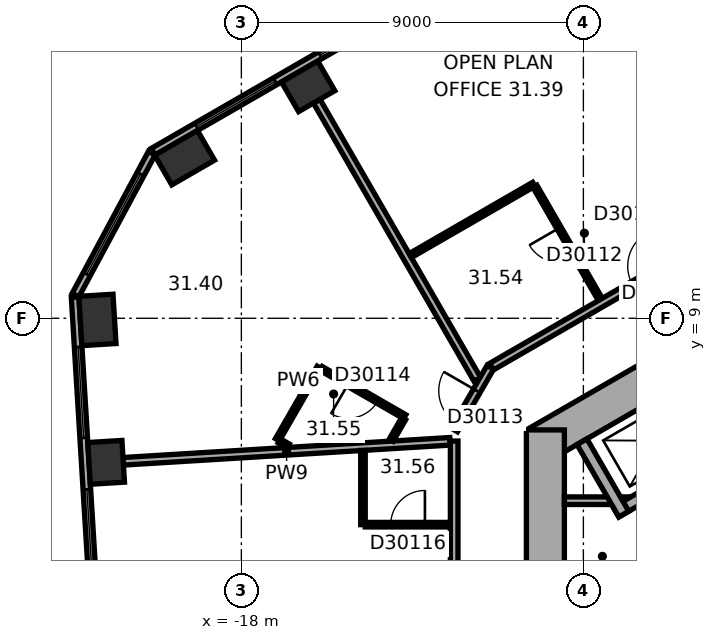
"""IFC4 building model, lengths in metres.
Left out: names, types, materials, properties, quantities, classifications, styles, units other than length and angle.
Written with IfcOpenShell. Run it as: python <this file> out.ifc"""

import sys

from ifc_helpers import new_model, si_unit, direction, frame, frame_2d, origin, origin_2d, place, context, subcontext, project, spatial, rectangle, extrude, element, fill, save


model = new_model("IFC4")
c1 = context("Model", 3, precision=1e-05, world=origin(), true_north=direction((0.0, 1.0)))
c2 = subcontext(c1, "Body", "Model", "MODEL_VIEW")
j1 = project(units=[si_unit("LENGTHUNIT", "METRE"), si_unit("PLANEANGLEUNIT", "RADIAN")], contexts=[c1])
p1 = place(None, origin())
s1 = spatial("IfcSite", under=j1, at=p1, CompositionType="ELEMENT")
p2 = place(p1, origin())
s2 = spatial("IfcBuilding", under=s1, at=p2, CompositionType="ELEMENT")
p3 = place(p2, frame((0.0, 0.0, 128.1)))
s3 = spatial("IfcBuildingStorey", under=s2, at=p3, CompositionType="ELEMENT", Elevation=128.1)
p4 = place(p3, frame((-16.242, 15.102, 0.0), z_axis=(0.0, 0.0, 1.0), x_axis=(-0.866025403784, -0.5, 0.0)))
e1 = element("IfcColumn", 1, at=p4, inside=s3, PredefinedType="COLUMN", context=c2, shape_type="SweptSolid", body=[
    extrude(rectangle(XDim=1.1, YDim=0.9, at=origin_2d()), origin(), (0.0, 0.0, 1.0), 3.7),
])
for number, where, z_axis, x_axis in (
    (2, (-19.494, 13.225, 0.0), (0.0, 0.0, 1.0), (-0.866, -0.5, 0.0)),
    (3, (-21.787, 8.956, 0.0), (0.0, 0.0, 1.0), (0.061, -0.998, 0.0)),
):
    element("IfcColumn", number, at=place(p3, frame(where, z_axis=z_axis, x_axis=x_axis)), inside=s3, PredefinedType="COLUMN", context=c2, shape_type="SweptSolid", body=[
        extrude(rectangle(XDim=1.3, YDim=0.9, at=origin_2d()), origin(), (0.0, 0.0, 1.0), 3.7),
    ])
p5 = place(p3, frame((-21.558, 5.209, 0.0), z_axis=(0.0, 0.0, 1.0), x_axis=(0.061048539535, -0.998134798422, 0.0)))
e4 = element("IfcColumn", 4, at=p5, inside=s3, PredefinedType="COLUMN", context=c2, shape_type="SweptSolid", body=[
    extrude(rectangle(XDim=1.1, YDim=0.9, at=origin_2d()), origin(), (0.0, 0.0, 1.0), 3.7),
])
p6 = place(p3, frame((0.25, 11.691, 0.0), z_axis=(0.0, 0.0, 1.0), x_axis=(-0.866022616891, -0.50000482701, 0.0)))
e5 = element("IfcWall", 5, at=p6, inside=s3, PredefinedType="SHEAR", context=c2, shape_type="SweptSolid", body=[
    extrude(rectangle(XDim=12.125, YDim=1.0, at=frame_2d((6.062, 0.0))), origin(), (0.0, 0.0, 1.0), 3.7),
])
p7 = place(p6, frame((6.262, 0.0, 0.0)))
e6 = element("IfcOpeningElement", 6, at=p7, cuts=e5, PredefinedType="OPENING", context=c2, shape_type="SweptSolid", body=[
    extrude(rectangle(XDim=1.5, YDim=2.1, at=frame_2d((0.75, 1.05))), frame((0.0, 0.51, 0.0), z_axis=(0.0, -1.0, 0.0), x_axis=(1.0, 0.0, 0.0)), (0.0, 0.0, 1.0), 1.02),
])
p8 = place(p6, frame((1.712, 0.0, 0.0)))
e7 = element("IfcOpeningElement", 7, at=p8, cuts=e5, PredefinedType="OPENING", context=c2, shape_type="SweptSolid", body=[
    extrude(rectangle(XDim=1.1, YDim=2.1, at=frame_2d((0.55, 1.05))), frame((0.0, 0.51, 0.0), z_axis=(0.0, -1.0, 0.0), x_axis=(1.0, 0.0, 0.0)), (0.0, 0.0, 1.0), 1.02),
])
p9 = place(p3, frame((-10.0, 6.062, 0.0), z_axis=(0.0, 0.0, 1.0), x_axis=(0.0, -1.0, 0.0)))
e8 = element("IfcWall", 8, at=p9, inside=s3, PredefinedType="SHEAR", context=c2, shape_type="SweptSolid", body=[
    extrude(rectangle(XDim=12.125, YDim=1.0, at=frame_2d((6.062, 0.0))), origin(), (0.0, 0.0, 1.0), 3.7),
])
p10 = place(p9, frame((6.612, 0.0, 0.0)))
e9 = element("IfcOpeningElement", 9, at=p10, cuts=e8, PredefinedType="OPENING", context=c2, shape_type="SweptSolid", body=[
    extrude(rectangle(XDim=0.9, YDim=2.1, at=frame_2d((0.45, 1.05))), frame((0.0, 0.51, 0.0), z_axis=(0.0, -1.0, 0.0), x_axis=(1.0, 0.0, 0.0)), (0.0, 0.0, 1.0), 1.02),
])
p11 = place(p3, frame((-2.961, 23.405, 0.0), z_axis=(0.0, 0.0, 1.0), x_axis=(-0.866023315909, -0.500003616288, 0.0)))
e10 = element("IfcWall", 10, at=p11, inside=s3, PredefinedType="STANDARD", context=c2, shape_type="SweptSolid", body=[
    extrude(rectangle(XDim=20.044, YDim=0.2, at=frame_2d((10.022, 0.0))), origin(), (0.0, 0.0, 1.0), 3.7),
])
p12 = place(p11, frame((1.314, 0.0, 0.9)))
e11 = element("IfcOpeningElement", 11, at=p12, cuts=e10, PredefinedType="OPENING", context=c2, shape_type="SweptSolid", body=[
    extrude(rectangle(XDim=2.4, YDim=2.0, at=frame_2d((1.2, 1.0))), frame((0.0, 0.11, 0.0), z_axis=(0.0, -1.0, 0.0), x_axis=(1.0, 0.0, 0.0)), (0.0, 0.0, 1.0), 0.22),
])
p13 = place(p11, frame((5.069, 0.0, 0.9)))
e12 = element("IfcOpeningElement", 12, at=p13, cuts=e10, PredefinedType="OPENING", context=c2, shape_type="SweptSolid", body=[
    extrude(rectangle(XDim=2.4, YDim=2.0, at=frame_2d((1.2, 1.0))), frame((0.0, 0.11, 0.0), z_axis=(0.0, -1.0, 0.0), x_axis=(1.0, 0.0, 0.0)), (0.0, 0.0, 1.0), 0.22),
])
p14 = place(p11, frame((8.823, 0.0, 0.9)))
e13 = element("IfcOpeningElement", 13, at=p14, cuts=e10, PredefinedType="OPENING", context=c2, shape_type="SweptSolid", body=[
    extrude(rectangle(XDim=2.4, YDim=2.0, at=frame_2d((1.2, 1.0))), frame((0.0, 0.11, 0.0), z_axis=(0.0, -1.0, 0.0), x_axis=(1.0, 0.0, 0.0)), (0.0, 0.0, 1.0), 0.22),
])
p15 = place(p11, frame((12.577, 0.0, 0.9)))
e14 = element("IfcOpeningElement", 14, at=p15, cuts=e10, PredefinedType="OPENING", context=c2, shape_type="SweptSolid", body=[
    extrude(rectangle(XDim=2.4, YDim=2.0, at=frame_2d((1.2, 1.0))), frame((0.0, 0.11, 0.0), z_axis=(0.0, -1.0, 0.0), x_axis=(1.0, 0.0, 0.0)), (0.0, 0.0, 1.0), 0.22),
])
p16 = place(p11, frame((16.331, 0.0, 0.9)))
e15 = element("IfcOpeningElement", 15, at=p16, cuts=e10, PredefinedType="OPENING", context=c2, shape_type="SweptSolid", body=[
    extrude(rectangle(XDim=2.4, YDim=2.0, at=frame_2d((1.2, 1.0))), frame((0.0, 0.11, 0.0), z_axis=(0.0, -1.0, 0.0), x_axis=(1.0, 0.0, 0.0)), (0.0, 0.0, 1.0), 0.22),
])
p17 = place(p3, frame((-20.357, 13.344, 0.0), z_axis=(0.0, 0.0, 1.0), x_axis=(-0.473288913494, -0.880907262068, 0.0)))
e16 = element("IfcWall", 16, at=p17, inside=s3, PredefinedType="STANDARD", context=c2, shape_type="SweptSolid", body=[
    extrude(rectangle(XDim=4.238, YDim=0.2, at=frame_2d((2.119, 0.0))), origin(), (0.0, 0.0, 1.0), 3.7),
])
p18 = place(p17, frame((0.619, 0.0, 0.9)))
e17 = element("IfcOpeningElement", 17, at=p18, cuts=e16, PredefinedType="OPENING", context=c2, shape_type="SweptSolid", body=[
    extrude(rectangle(XDim=3.0, YDim=2.0, at=frame_2d((1.5, 1.0))), frame((0.0, 0.11, 0.0), z_axis=(0.0, -1.0, 0.0), x_axis=(1.0, 0.0, 0.0)), (0.0, 0.0, 1.0), 0.22),
])
p19 = place(p3, frame((-22.375, 9.557, 0.0), z_axis=(0.0, 0.0, 1.0), x_axis=(0.061036015339, -0.998135564356, 0.0)))
e18 = element("IfcWall", 18, at=p19, inside=s3, PredefinedType="STANDARD", context=c2, shape_type="SweptSolid", body=[
    extrude(rectangle(XDim=20.044, YDim=0.2, at=frame_2d((10.022, 0.0))), origin(), (0.0, 0.0, 1.0), 3.7),
])
p20 = place(p19, frame((1.313, 0.0, 0.9)))
e19 = element("IfcOpeningElement", 19, at=p20, cuts=e18, PredefinedType="OPENING", context=c2, shape_type="SweptSolid", body=[
    extrude(rectangle(XDim=2.4, YDim=2.0, at=frame_2d((1.2, 1.0))), frame((0.0, 0.11, 0.0), z_axis=(0.0, -1.0, 0.0), x_axis=(1.0, 0.0, 0.0)), (0.0, 0.0, 1.0), 0.22),
])
p21 = place(p19, frame((5.067, 0.0, 0.9)))
e20 = element("IfcOpeningElement", 20, at=p21, cuts=e18, PredefinedType="OPENING", context=c2, shape_type="SweptSolid", body=[
    extrude(rectangle(XDim=2.4, YDim=2.0, at=frame_2d((1.2, 1.0))), frame((0.0, 0.11, 0.0), z_axis=(0.0, -1.0, 0.0), x_axis=(1.0, 0.0, 0.0)), (0.0, 0.0, 1.0), 0.22),
])
p22 = place(p19, frame((8.821, 0.0, 0.9)))
e21 = element("IfcOpeningElement", 21, at=p22, cuts=e18, PredefinedType="OPENING", context=c2, shape_type="SweptSolid", body=[
    extrude(rectangle(XDim=2.4, YDim=2.0, at=frame_2d((1.2, 1.0))), frame((0.0, 0.11, 0.0), z_axis=(0.0, -1.0, 0.0), x_axis=(1.0, 0.0, 0.0)), (0.0, 0.0, 1.0), 0.22),
])
p23 = place(p19, frame((12.575, 0.0, 0.9)))
e22 = element("IfcOpeningElement", 22, at=p23, cuts=e18, PredefinedType="OPENING", context=c2, shape_type="SweptSolid", body=[
    extrude(rectangle(XDim=2.4, YDim=2.0, at=frame_2d((1.2, 1.0))), frame((0.0, 0.11, 0.0), z_axis=(0.0, -1.0, 0.0), x_axis=(1.0, 0.0, 0.0)), (0.0, 0.0, 1.0), 0.22),
])
p24 = place(p19, frame((16.329, 0.0, 0.9)))
e23 = element("IfcOpeningElement", 23, at=p24, cuts=e18, PredefinedType="OPENING", context=c2, shape_type="SweptSolid", body=[
    extrude(rectangle(XDim=2.4, YDim=2.0, at=frame_2d((1.2, 1.0))), frame((0.0, 0.11, 0.0), z_axis=(0.0, -1.0, 0.0), x_axis=(1.0, 0.0, 0.0)), (0.0, 0.0, 1.0), 0.22),
])
p25 = place(p3, frame((-7.3, 4.2, 0.0), z_axis=(0.0, 0.0, 1.0), x_axis=(-1.0, 0.0, 0.0)))
e24 = element("IfcWall", 24, at=p25, inside=s3, PredefinedType="PARTITIONING", context=c2, shape_type="SweptSolid", body=[
    extrude(rectangle(XDim=2.2, YDim=0.2, at=frame_2d((1.1, 0.0))), origin(), (0.0, 0.0, 1.0), 3.42),
])
p26 = place(p3, frame((-5.24, 5.577, 0.0), z_axis=(0.0, 0.0, 1.0), x_axis=(-0.866014461049, -0.500018952895, 0.0)))
e25 = element("IfcWall", 25, at=p26, inside=s3, PredefinedType="SHEAR", context=c2, shape_type="SweptSolid", body=[
    extrude(rectangle(XDim=3.35, YDim=0.3, at=frame_2d((1.675, 0.0))), origin(), (0.0, 0.0, 1.0), 3.42),
])
p27 = place(p3, frame((-7.937, 3.847, 0.0), z_axis=(0.0, 0.0, 1.0), x_axis=(-0.50002983664, 0.866008176907, 0.0)))
e26 = element("IfcWall", 26, at=p27, inside=s3, PredefinedType="SHEAR", context=c2, shape_type="SweptSolid", body=[
    extrude(rectangle(XDim=2.2, YDim=0.3, at=frame_2d((1.1, 0.0))), origin(), (0.0, 0.0, 1.0), 3.42),
])
p28 = place(p3, frame((-21.109, 5.237, 0.0), z_axis=(0.0, 0.0, 1.0), x_axis=(0.998135264293, 0.061040922131, 0.0)))
e27 = element("IfcWall", 27, at=p28, inside=s3, PredefinedType="PARTITIONING", context=c2, shape_type="SweptSolid", body=[
    extrude(rectangle(XDim=8.615, YDim=0.2, at=frame_2d((4.308, 0.0))), origin(), (0.0, 0.0, 1.0), 3.42),
])
p29 = place(p3, frame((-17.052, 5.804, 0.0), z_axis=(0.0, 0.0, 1.0), x_axis=(0.50002983664, 0.866008176907, 0.0)))
e28 = element("IfcWall", 28, at=p29, inside=s3, PredefinedType="PARTITIONING", context=c2, shape_type="SweptSolid", body=[
    extrude(rectangle(XDim=2.2, YDim=0.12, at=frame_2d((1.1, 0.0))), origin(), (0.0, 0.0, 1.0), 3.42),
])
p30 = place(p3, frame((-16.769, 5.64, 0.0), z_axis=(0.0, 0.0, 1.0), x_axis=(-0.865926680471, 0.500170954823, 0.0)))
e29 = element("IfcWall", 29, at=p30, inside=s3, PredefinedType="PARTITIONING", context=c2, shape_type="SweptSolid", body=[
    extrude(rectangle(XDim=0.267, YDim=0.12, at=frame_2d((0.134, 0.0))), origin(), (0.0, 0.0, 1.0), 3.42),
])
p31 = place(p3, frame((-16.018, 14.712, 0.0), z_axis=(0.0, 0.0, 1.0), x_axis=(0.500000843414, -0.866024916838, 0.0)))
e30 = element("IfcWall", 30, at=p31, inside=s3, PredefinedType="PARTITIONING", context=c2, shape_type="SweptSolid", body=[
    extrude(rectangle(XDim=8.452, YDim=0.2, at=frame_2d((4.226, 0.0))), origin(), (0.0, 0.0, 1.0), 3.42),
])
p32 = place(p3, frame((-15.9, 7.679, 0.0), z_axis=(0.0, 0.0, 1.0), x_axis=(0.866022320763, -0.500005339912, 0.0)))
e31 = element("IfcWall", 31, at=p32, inside=s3, PredefinedType="PARTITIONING", context=c2, shape_type="SweptSolid", body=[
    extrude(rectangle(XDim=2.54, YDim=0.12, at=frame_2d((1.27, 0.0))), origin(), (0.0, 0.0, 1.0), 3.42),
])
p33 = place(p32, frame((0.82, 0.0, 0.0)))
e32 = element("IfcOpeningElement", 32, at=p33, cuts=e31, PredefinedType="OPENING", context=c2, shape_type="SweptSolid", body=[
    extrude(rectangle(XDim=0.9, YDim=2.1, at=frame_2d((0.45, 1.05))), frame((0.0, 0.07, 0.0), z_axis=(0.0, -1.0, 0.0), x_axis=(1.0, 0.0, 0.0)), (0.0, 0.0, 1.0), 0.14),
])
p34 = place(p3, frame((-14.8, 3.569, 0.0), z_axis=(0.0, 0.0, 1.0), x_axis=(0.0, 1.0, 0.0)))
e33 = element("IfcWall", 33, at=p34, inside=s3, PredefinedType="PARTITIONING", context=c2, shape_type="SweptSolid", body=[
    extrude(rectangle(XDim=1.953, YDim=0.12, at=frame_2d((0.977, 0.0))), origin(), (0.0, 0.0, 1.0), 3.42),
])
p35 = place(p3, frame((-13.731, 6.357, 0.0), z_axis=(0.0, 0.0, 1.0), x_axis=(-0.500090215447, -0.865973311606, 0.0)))
e34 = element("IfcWall", 34, at=p35, inside=s3, PredefinedType="PARTITIONING", context=c2, shape_type="SweptSolid", body=[
    extrude(rectangle(XDim=0.651, YDim=0.12, at=frame_2d((0.326, 0.0))), origin(), (0.0, 0.0, 1.0), 3.42),
])
p36 = place(p3, frame((-13.556, 10.649, 0.0), z_axis=(0.0, 0.0, 1.0), x_axis=(0.866020939036, 0.500007733091, 0.0)))
e35 = element("IfcWall", 35, at=p36, inside=s3, PredefinedType="PARTITIONING", context=c2, shape_type="SweptSolid", body=[
    extrude(rectangle(XDim=3.753, YDim=0.12, at=frame_2d((1.877, 0.0))), origin(), (0.0, 0.0, 1.0), 3.42),
])
p37 = place(p3, frame((-12.5, 3.569, 0.0), z_axis=(0.0, 0.0, 1.0), x_axis=(-1.0, 0.0, 0.0)))
e36 = element("IfcWall", 36, at=p37, inside=s3, PredefinedType="PARTITIONING", context=c2, shape_type="SweptSolid", body=[
    extrude(rectangle(XDim=2.24, YDim=0.12, at=frame_2d((1.12, 0.0))), origin(), (0.0, 0.0, 1.0), 3.42),
])
p38 = place(p37, frame((0.67, 0.0, 0.0)))
e37 = element("IfcOpeningElement", 37, at=p38, cuts=e36, PredefinedType="OPENING", context=c2, shape_type="SweptSolid", body=[
    extrude(rectangle(XDim=0.9, YDim=2.1, at=frame_2d((0.45, 1.05))), frame((0.0, 0.07, 0.0), z_axis=(0.0, -1.0, 0.0), x_axis=(1.0, 0.0, 0.0)), (0.0, 0.0, 1.0), 0.14),
])
p39 = place(p3, frame((-12.4, 5.769, 0.0), z_axis=(0.0, 0.0, 1.0), x_axis=(0.0, -1.0, 0.0)))
e38 = element("IfcWall", 38, at=p39, inside=s3, PredefinedType="PARTITIONING", context=c2, shape_type="SweptSolid", body=[
    extrude(rectangle(XDim=11.792, YDim=0.2, at=frame_2d((5.896, 0.0))), origin(), (0.0, 0.0, 1.0), 3.42),
])
p40 = place(p39, frame((6.267, 0.0, 0.0)))
e39 = element("IfcOpeningElement", 39, at=p40, cuts=e38, PredefinedType="OPENING", context=c2, shape_type="SweptSolid", body=[
    extrude(rectangle(XDim=1.0, YDim=2.1, at=frame_2d((0.5, 1.05))), frame((0.0, 0.11, 0.0), z_axis=(0.0, -1.0, 0.0), x_axis=(1.0, 0.0, 0.0)), (0.0, 0.0, 1.0), 0.22),
])
p41 = place(p3, frame((-11.45, 7.708, 0.0), z_axis=(0.0, 0.0, 1.0), x_axis=(-0.500022797313, -0.86601224135, 0.0)))
e40 = element("IfcWall", 40, at=p41, inside=s3, PredefinedType="PARTITIONING", context=c2, shape_type="SweptSolid", body=[
    extrude(rectangle(XDim=1.9, YDim=0.2, at=frame_2d((0.95, 0.0))), origin(), (0.0, 0.0, 1.0), 3.42),
])
p42 = place(p41, frame((0.712, 0.0, 0.0)))
e41 = element("IfcOpeningElement", 41, at=p42, cuts=e40, PredefinedType="OPENING", context=c2, shape_type="SweptSolid", body=[
    extrude(rectangle(XDim=1.0, YDim=2.1, at=frame_2d((0.5, 1.05))), frame((0.0, 0.11, 0.0), z_axis=(0.0, -1.0, 0.0), x_axis=(1.0, 0.0, 0.0)), (0.0, 0.0, 1.0), 0.22),
])
p43 = place(p3, frame((-10.275, 12.473, 0.0), z_axis=(0.0, 0.0, 1.0), x_axis=(0.500009156386, -0.866020117278, 0.0)))
e42 = element("IfcWall", 42, at=p43, inside=s3, PredefinedType="PARTITIONING", context=c2, shape_type="SweptSolid", body=[
    extrude(rectangle(XDim=3.44, YDim=0.12, at=frame_2d((1.72, 0.0))), origin(), (0.0, 0.0, 1.0), 3.42),
])
p44 = place(p43, frame((1.27, 0.0, 0.0)))
e43 = element("IfcOpeningElement", 43, at=p44, cuts=e42, PredefinedType="OPENING", context=c2, shape_type="SweptSolid", body=[
    extrude(rectangle(XDim=0.9, YDim=2.1, at=frame_2d((0.45, 1.05))), frame((0.0, 0.07, 0.0), z_axis=(0.0, -1.0, 0.0), x_axis=(1.0, 0.0, 0.0)), (0.0, 0.0, 1.0), 0.14),
])
p45 = place(p3, frame((-4.209, 11.888, 0.0), z_axis=(0.0, 0.0, 1.0), x_axis=(-0.866020930448, -0.500007747966, 0.0)))
e44 = element("IfcWall", 44, at=p45, inside=s3, PredefinedType="PARTITIONING", context=c2, shape_type="SweptSolid", body=[
    extrude(rectangle(XDim=8.321, YDim=0.2, at=frame_2d((4.161, 0.0))), origin(), (0.0, 0.0, 1.0), 3.42),
])
p46 = place(p45, frame((3.031, 0.0, 0.0)))
e45 = element("IfcOpeningElement", 45, at=p46, cuts=e44, PredefinedType="OPENING", context=c2, shape_type="SweptSolid", body=[
    extrude(rectangle(XDim=1.0, YDim=2.1, at=frame_2d((0.5, 1.05))), frame((0.0, 0.11, 0.0), z_axis=(0.0, -1.0, 0.0), x_axis=(1.0, 0.0, 0.0)), (0.0, 0.0, 1.0), 0.22),
])
p47 = place(p15, origin())
e46 = element("IfcWindow", 46, at=p47, inside=s3, PartitioningType="SINGLE_PANEL", PredefinedType="WINDOW", context=c2, shape_type="SweptSolid", body=[
    extrude(rectangle(XDim=2.4, YDim=2.0, at=frame_2d((1.2, 1.0))), frame((0.0, 0.03, 0.0), z_axis=(0.0, -1.0, 0.0), x_axis=(1.0, 0.0, 0.0)), (0.0, 0.0, 1.0), 0.06),
])
fill(e14, e46)
p48 = place(p16, origin())
e47 = element("IfcWindow", 47, at=p48, inside=s3, PartitioningType="SINGLE_PANEL", PredefinedType="WINDOW", context=c2, shape_type="SweptSolid", body=[
    extrude(rectangle(XDim=2.4, YDim=2.0, at=frame_2d((1.2, 1.0))), frame((0.0, 0.03, 0.0), z_axis=(0.0, -1.0, 0.0), x_axis=(1.0, 0.0, 0.0)), (0.0, 0.0, 1.0), 0.06),
])
fill(e15, e47)
p49 = place(p18, origin())
e48 = element("IfcWindow", 48, at=p49, inside=s3, PartitioningType="SINGLE_PANEL", PredefinedType="WINDOW", context=c2, shape_type="SweptSolid", body=[
    extrude(rectangle(XDim=3.0, YDim=2.0, at=frame_2d((1.5, 1.0))), frame((0.0, 0.03, 0.0), z_axis=(0.0, -1.0, 0.0), x_axis=(1.0, 0.0, 0.0)), (0.0, 0.0, 1.0), 0.06),
])
fill(e17, e48)
p50 = place(p20, origin())
e49 = element("IfcWindow", 49, at=p50, inside=s3, PartitioningType="SINGLE_PANEL", PredefinedType="WINDOW", context=c2, shape_type="SweptSolid", body=[
    extrude(rectangle(XDim=2.4, YDim=2.0, at=frame_2d((1.2, 1.0))), frame((0.0, 0.03, 0.0), z_axis=(0.0, -1.0, 0.0), x_axis=(1.0, 0.0, 0.0)), (0.0, 0.0, 1.0), 0.06),
])
fill(e19, e49)
p51 = place(p21, origin())
e50 = element("IfcWindow", 50, at=p51, inside=s3, PartitioningType="SINGLE_PANEL", PredefinedType="WINDOW", context=c2, shape_type="SweptSolid", body=[
    extrude(rectangle(XDim=2.4, YDim=2.0, at=frame_2d((1.2, 1.0))), frame((0.0, 0.03, 0.0), z_axis=(0.0, -1.0, 0.0), x_axis=(1.0, 0.0, 0.0)), (0.0, 0.0, 1.0), 0.06),
])
fill(e20, e50)
p52 = place(p46, origin())
e51 = element("IfcDoor", 51, at=p52, inside=s3, OperationType="SINGLE_SWING_LEFT", PredefinedType="DOOR", context=c2, shape_type="SweptSolid", body=[
    extrude(rectangle(XDim=1.0, YDim=2.1, at=frame_2d((0.5, 1.05))), frame((0.0, 0.025, 0.0), z_axis=(0.0, -1.0, 0.0), x_axis=(1.0, 0.0, 0.0)), (0.0, 0.0, 1.0), 0.05),
])
fill(e45, e51)
p53 = place(p44, origin())
e52 = element("IfcDoor", 52, at=p53, inside=s3, OperationType="SINGLE_SWING_LEFT", PredefinedType="DOOR", context=c2, shape_type="SweptSolid", body=[
    extrude(rectangle(XDim=0.9, YDim=2.1, at=frame_2d((0.45, 1.05))), frame((0.0, 0.025, 0.0), z_axis=(0.0, -1.0, 0.0), x_axis=(1.0, 0.0, 0.0)), (0.0, 0.0, 1.0), 0.05),
])
fill(e43, e52)
p54 = place(p42, origin())
e53 = element("IfcDoor", 53, at=p54, inside=s3, OperationType="SINGLE_SWING_LEFT", PredefinedType="DOOR", context=c2, shape_type="SweptSolid", body=[
    extrude(rectangle(XDim=1.0, YDim=2.1, at=frame_2d((0.5, 1.05))), frame((0.0, 0.025, 0.0), z_axis=(0.0, -1.0, 0.0), x_axis=(1.0, 0.0, 0.0)), (0.0, 0.0, 1.0), 0.05),
])
fill(e41, e53)
p55 = place(p33, origin())
e54 = element("IfcDoor", 54, at=p55, inside=s3, OperationType="SINGLE_SWING_LEFT", PredefinedType="DOOR", context=c2, shape_type="SweptSolid", body=[
    extrude(rectangle(XDim=0.9, YDim=2.1, at=frame_2d((0.45, 1.05))), frame((0.0, 0.025, 0.0), z_axis=(0.0, -1.0, 0.0), x_axis=(1.0, 0.0, 0.0)), (0.0, 0.0, 1.0), 0.05),
])
fill(e32, e54)
p56 = place(p38, origin())
e55 = element("IfcDoor", 55, at=p56, inside=s3, OperationType="SINGLE_SWING_LEFT", PredefinedType="DOOR", context=c2, shape_type="SweptSolid", body=[
    extrude(rectangle(XDim=0.9, YDim=2.1, at=frame_2d((0.45, 1.05))), frame((0.0, 0.025, 0.0), z_axis=(0.0, -1.0, 0.0), x_axis=(1.0, 0.0, 0.0)), (0.0, 0.0, 1.0), 0.05),
])
fill(e37, e55)
save(model, sys.argv[1])
